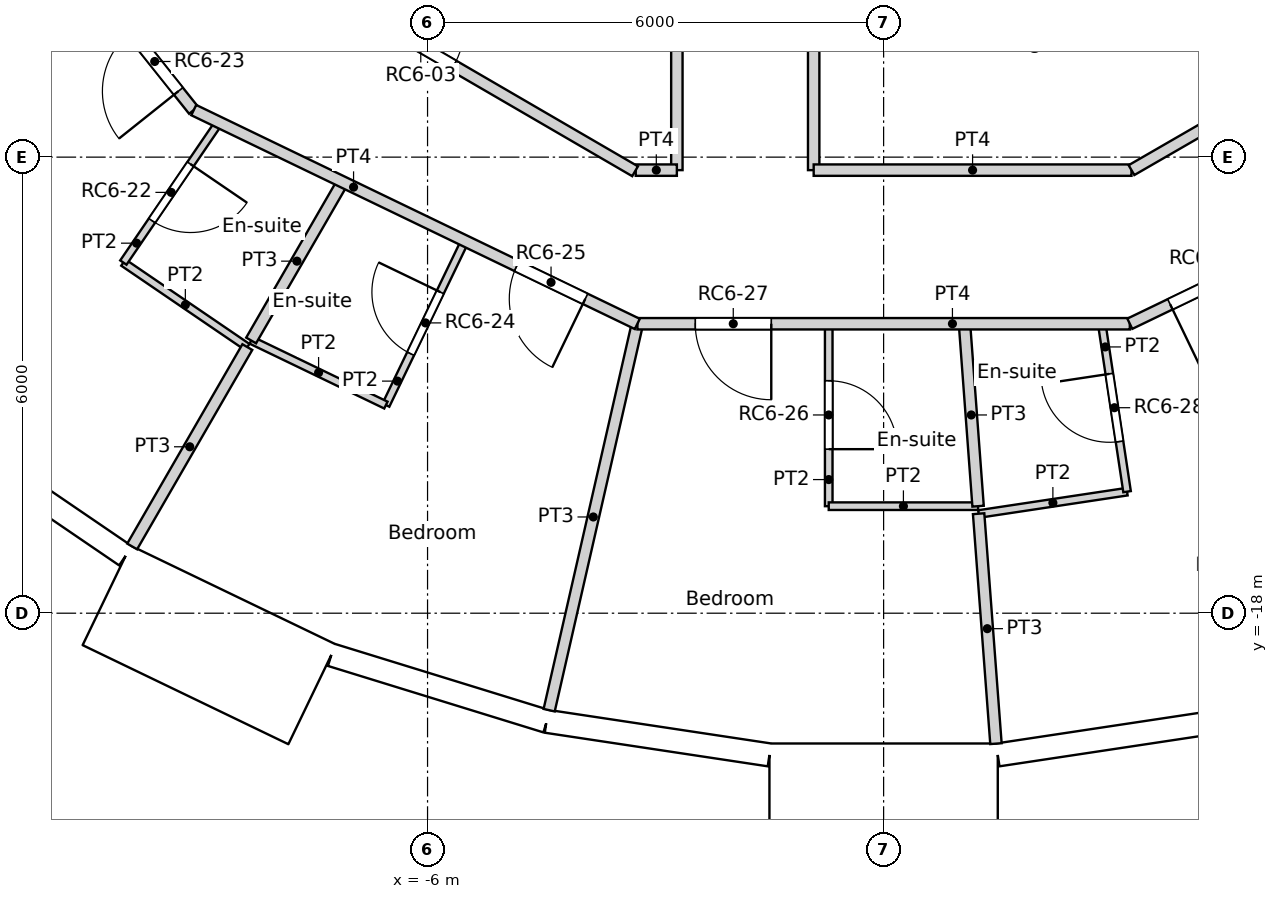
"""IFC4 building model, lengths in metres.
Left out: names, types, materials, properties, quantities, classifications, styles, units other than length and angle.
Written with IfcOpenShell. Run it as: python <this file> out.ifc"""

import sys

from ifc_helpers import new_model, si_unit, direction, frame, frame_2d, origin, origin_2d, place, context, subcontext, project, spatial, rectangle, circle, extrude, element, fill, save


model = new_model("IFC4")
c1 = context("Model", 3, precision=1e-05, world=origin(), true_north=direction((0.0, 1.0)))
c2 = subcontext(c1, "Body", "Model", "MODEL_VIEW")
j1 = project(units=[si_unit("LENGTHUNIT", "METRE"), si_unit("PLANEANGLEUNIT", "RADIAN")], contexts=[c1])
p1 = place(None, origin())
s1 = spatial("IfcSite", under=j1, at=p1, CompositionType="ELEMENT")
p2 = place(p1, origin())
s2 = spatial("IfcBuilding", under=s1, at=p2, CompositionType="ELEMENT")
p3 = place(p2, frame((0.0, 0.0, 283.8)))
s3 = spatial("IfcBuildingStorey", under=s2, at=p3, CompositionType="ELEMENT", Elevation=283.8)
for number, where, z_axis, x_axis in (
    (1, (-9.411, -16.301, 0.0), (0.0, 0.0, 1.0), (1.0, 0.0, 0.0)),
    (2, (-4.188, -18.35, 0.0), (0.0, 0.0, 1.0), (1.0, 0.0, 0.0)),
    (3, (1.406, -18.77, 0.0), (0.0, 0.0, 1.0), (1.0, 0.0, 0.0)),
):
    element("IfcColumn", number, at=place(p3, frame(where, z_axis=z_axis, x_axis=x_axis)), inside=s3, PredefinedType="COLUMN", context=c2, shape_type="SweptSolid", body=[
        extrude(circle(Radius=0.45, at=origin_2d()), origin(), (0.0, 0.0, 1.0), 3.6),
    ])
p4 = place(p3, frame((-12.421, -15.575, 0.0), z_axis=(0.0, 0.0, 1.0), x_axis=(0.826236061068, -0.563324037646, 0.0)))
e4 = element("IfcWall", 4, at=p4, inside=s3, PredefinedType="SOLIDWALL", context=c2, shape_type="SweptSolid", body=[
    extrude(rectangle(XDim=2.962, YDim=0.3, at=frame_2d((1.481, 0.0))), origin(), (0.0, 0.0, 1.0), 3.25),
])
p5 = place(p4, frame((1.481, 0.0, 1.55)))
e5 = element("IfcOpeningElement", 5, at=p5, cuts=e4, PredefinedType="OPENING", context=c2, shape_type="SweptSolid", body=[
    extrude(circle(Radius=0.9, at=origin_2d()), frame((0.0, 0.16, 0.0), z_axis=(0.0, -1.0, 0.0), x_axis=(1.0, 0.0, 0.0)), (0.0, 0.0, 1.0), 0.32),
])
p6 = place(p3, frame((-10.22, -17.766, -0.35), z_axis=(0.0, 0.0, 1.0), x_axis=(0.900953362039, -0.433915935904, 0.0)))
e6 = element("IfcWall", 6, at=p6, inside=s3, PredefinedType="ELEMENTEDWALL", context=c2, shape_type="SweptSolid", body=[
    extrude(rectangle(XDim=3.0, YDim=1.45, at=frame_2d((1.5, 0.0))), origin(), (0.0, 0.0, 1.0), 3.6),
])
p7 = place(p6, frame((1.5, 0.0, 1.9)))
e7 = element("IfcOpeningElement", 7, at=p7, cuts=e6, PredefinedType="OPENING", context=c2, shape_type="SweptSolid", body=[
    extrude(circle(Radius=0.9, at=origin_2d()), frame((0.0, 0.735, 0.0), z_axis=(0.0, -1.0, 0.0), x_axis=(1.0, 0.0, 0.0)), (0.0, 0.0, 1.0), 1.47),
])
p8 = place(p3, frame((-7.264, -18.549, 0.0), z_axis=(0.0, 0.0, 1.0), x_axis=(0.955555982805, -0.29480970765, 0.0)))
e8 = element("IfcWall", 8, at=p8, inside=s3, PredefinedType="SOLIDWALL", context=c2, shape_type="SweptSolid", body=[
    extrude(rectangle(XDim=2.962, YDim=0.3, at=frame_2d((1.481, 0.0))), origin(), (0.0, 0.0, 1.0), 3.25),
])
p9 = place(p8, frame((1.481, 0.0, 1.55)))
e9 = element("IfcOpeningElement", 9, at=p9, cuts=e8, PredefinedType="OPENING", context=c2, shape_type="SweptSolid", body=[
    extrude(circle(Radius=0.9, at=origin_2d()), frame((0.0, 0.16, 0.0), z_axis=(0.0, -1.0, 0.0), x_axis=(1.0, 0.0, 0.0)), (0.0, 0.0, 1.0), 0.32),
])
p10 = place(p3, frame((-4.433, -19.422, 0.0), z_axis=(0.0, 0.0, 1.0), x_axis=(0.988835775663, -0.149009425104, 0.0)))
e10 = element("IfcWall", 10, at=p10, inside=s3, PredefinedType="SOLIDWALL", context=c2, shape_type="SweptSolid", body=[
    extrude(rectangle(XDim=2.962, YDim=0.3, at=frame_2d((1.481, 0.0))), origin(), (0.0, 0.0, 1.0), 3.25),
])
p11 = place(p10, frame((1.481, 0.0, 1.55)))
e11 = element("IfcOpeningElement", 11, at=p11, cuts=e10, PredefinedType="OPENING", context=c2, shape_type="SweptSolid", body=[
    extrude(circle(Radius=0.9, at=origin_2d()), frame((0.0, 0.16, 0.0), z_axis=(0.0, -1.0, 0.0), x_axis=(1.0, 0.0, 0.0)), (0.0, 0.0, 1.0), 0.32),
])
p12 = place(p3, frame((-1.5, -20.441, -0.35), z_axis=(0.0, 0.0, 1.0), x_axis=(1.0, 0.0, 0.0)))
e12 = element("IfcWall", 12, at=p12, inside=s3, PredefinedType="ELEMENTEDWALL", context=c2, shape_type="SweptSolid", body=[
    extrude(rectangle(XDim=3.0, YDim=1.45, at=frame_2d((1.5, 0.0))), origin(), (0.0, 0.0, 1.0), 3.6),
])
p13 = place(p12, frame((1.5, 0.0, 1.9)))
e13 = element("IfcOpeningElement", 13, at=p13, cuts=e12, PredefinedType="OPENING", context=c2, shape_type="SweptSolid", body=[
    extrude(circle(Radius=0.9, at=origin_2d()), frame((0.0, 0.735, 0.0), z_axis=(0.0, -1.0, 0.0), x_axis=(1.0, 0.0, 0.0)), (0.0, 0.0, 1.0), 1.47),
])
p14 = place(p3, frame((1.504, -19.864, 0.0), z_axis=(0.0, 0.0, 1.0), x_axis=(0.988835775663, 0.149009425104, 0.0)))
e14 = element("IfcWall", 14, at=p14, inside=s3, PredefinedType="SOLIDWALL", context=c2, shape_type="SweptSolid", body=[
    extrude(rectangle(XDim=2.962, YDim=0.3, at=frame_2d((1.481, 0.0))), origin(), (0.0, 0.0, 1.0), 3.25),
])
p15 = place(p14, frame((1.481, 0.0, 1.55)))
e15 = element("IfcOpeningElement", 15, at=p15, cuts=e14, PredefinedType="OPENING", context=c2, shape_type="SweptSolid", body=[
    extrude(circle(Radius=0.9, at=origin_2d()), frame((0.0, 0.16, 0.0), z_axis=(0.0, -1.0, 0.0), x_axis=(1.0, 0.0, 0.0)), (0.0, 0.0, 1.0), 0.32),
])
p16 = place(p3, frame((-9.092, -8.8, 0.0), z_axis=(0.0, 0.0, 1.0), x_axis=(0.864470922103, -0.502682827277, 0.0)))
e16 = element("IfcWall", 16, at=p16, inside=s3, PredefinedType="PARTITIONING", context=c2, shape_type="SweptSolid", body=[
    extrude(rectangle(XDim=6.735, YDim=0.15, at=frame_2d((3.368, 0.0))), origin(), (0.0, 0.0, 1.0), 3.25),
])
p17 = place(p16, frame((2.974, 0.0, 0.0)))
e17 = element("IfcOpeningElement", 17, at=p17, cuts=e16, PredefinedType="OPENING", context=c2, shape_type="SweptSolid", body=[
    extrude(rectangle(XDim=1.0, YDim=2.04, at=frame_2d((0.5, 1.02))), frame((0.0, 0.075, 0.0), z_axis=(0.0, -1.0, 0.0), x_axis=(1.0, 0.0, 0.0)), (0.0, 0.0, 1.0), 0.15),
])
p18 = place(p3, frame((-11.3, -8.596, 0.0), z_axis=(0.0, 0.0, 1.0), x_axis=(0.623390921228, -0.781910326911, 0.0)))
e18 = element("IfcWall", 18, at=p18, inside=s3, PredefinedType="PARTITIONING", context=c2, shape_type="SweptSolid", body=[
    extrude(rectangle(XDim=3.564, YDim=0.15, at=frame_2d((1.782, 0.0))), origin(), (0.0, 0.0, 1.0), 3.25),
])
p19 = place(p18, frame((2.244, 0.0, 0.0)))
e19 = element("IfcOpeningElement", 19, at=p19, cuts=e18, PredefinedType="OPENING", context=c2, shape_type="SweptSolid", body=[
    extrude(rectangle(XDim=1.0, YDim=2.1, at=frame_2d((0.5, 1.05))), frame((0.0, 0.075, 0.0), z_axis=(0.0, -1.0, 0.0), x_axis=(1.0, 0.0, 0.0)), (0.0, 0.0, 1.0), 0.15),
])
p20 = place(p3, frame((-3.261, -12.171, 0.0), z_axis=(0.0, 0.0, 1.0), x_axis=(1.0, 0.0, 0.0)))
e20 = element("IfcWall", 20, at=p20, inside=s3, PredefinedType="PARTITIONING", context=c2, shape_type="SweptSolid", body=[
    extrude(rectangle(XDim=0.541, YDim=0.15, at=frame_2d((0.271, 0.0))), origin(), (0.0, 0.0, 1.0), 3.25),
])
for number, where, z_axis, x_axis in (
    (21, (-2.72, -12.171, 0.0), (0.0, 0.0, 1.0), (0.0, 1.0, 0.0)),
    (22, (-0.92, -12.171, 0.0), (0.0, 0.0, 1.0), (0.0, 1.0, 0.0)),
):
    element("IfcWall", number, at=place(p3, frame(where, z_axis=z_axis, x_axis=x_axis)), inside=s3, PredefinedType="PARTITIONING", context=c2, shape_type="SweptSolid", body=[
        extrude(rectangle(XDim=3.371, YDim=0.15, at=frame_2d((1.686, 0.0))), origin(), (0.0, 0.0, 1.0), 3.25),
    ])
p21 = place(p3, frame((-0.92, -12.171, 0.0), z_axis=(0.0, 0.0, 1.0), x_axis=(1.0, 0.0, 0.0)))
e23 = element("IfcWall", 23, at=p21, inside=s3, PredefinedType="PARTITIONING", context=c2, shape_type="SweptSolid", body=[
    extrude(rectangle(XDim=4.181, YDim=0.15, at=frame_2d((2.09, 0.0))), origin(), (0.0, 0.0, 1.0), 3.25),
])
p22 = place(p3, frame((3.261, -12.171, 0.0), z_axis=(0.0, 0.0, 1.0), x_axis=(0.866066809554, 0.499928276245, 0.0)))
e24 = element("IfcWall", 24, at=p22, inside=s3, PredefinedType="PARTITIONING", context=c2, shape_type="SweptSolid", body=[
    extrude(rectangle(XDim=6.743, YDim=0.15, at=frame_2d((3.371, 0.0))), origin(), (0.0, 0.0, 1.0), 3.25),
])
p23 = place(p3, frame((-9.076, -11.381, 0.0), z_axis=(0.0, 0.0, 1.0), x_axis=(0.900778421649, -0.434278983018, 0.0)))
e25 = element("IfcWall", 25, at=p23, inside=s3, PredefinedType="PARTITIONING", context=c2, shape_type="SweptSolid", body=[
    extrude(rectangle(XDim=6.479, YDim=0.15, at=frame_2d((3.239, 0.0))), origin(), (0.0, 0.0, 1.0), 3.25),
])
p24 = place(p23, frame((4.719, 0.0, 0.0)))
e26 = element("IfcOpeningElement", 26, at=p24, cuts=e25, PredefinedType="OPENING", context=c2, shape_type="SweptSolid", body=[
    extrude(rectangle(XDim=1.0, YDim=2.1, at=frame_2d((0.5, 1.05))), frame((0.0, 0.075, 0.0), z_axis=(0.0, -1.0, 0.0), x_axis=(1.0, 0.0, 0.0)), (0.0, 0.0, 1.0), 0.15),
])
p25 = place(p3, frame((-3.239, -14.192, 0.0), z_axis=(0.0, 0.0, 1.0), x_axis=(1.0, 0.0, 0.0)))
e27 = element("IfcWall", 27, at=p25, inside=s3, PredefinedType="PARTITIONING", context=c2, shape_type="SweptSolid", body=[
    extrude(rectangle(XDim=6.478, YDim=0.15, at=frame_2d((3.239, 0.0))), origin(), (0.0, 0.0, 1.0), 3.25),
])
p26 = place(p25, frame((0.761, 0.0, 0.0)))
e28 = element("IfcOpeningElement", 28, at=p26, cuts=e27, PredefinedType="OPENING", context=c2, shape_type="SweptSolid", body=[
    extrude(rectangle(XDim=1.0, YDim=2.1, at=frame_2d((0.5, 1.05))), frame((0.0, 0.075, 0.0), z_axis=(0.0, -1.0, 0.0), x_axis=(1.0, 0.0, 0.0)), (0.0, 0.0, 1.0), 0.15),
])
p27 = place(p3, frame((3.239, -14.192, 0.0), z_axis=(0.0, 0.0, 1.0), x_axis=(0.900851590682, 0.434127183629, 0.0)))
e29 = element("IfcWall", 29, at=p27, inside=s3, PredefinedType="PARTITIONING", context=c2, shape_type="SweptSolid", body=[
    extrude(rectangle(XDim=6.479, YDim=0.15, at=frame_2d((3.239, 0.0))), origin(), (0.0, 0.0, 1.0), 3.25),
])
p28 = place(p27, frame((0.589, 0.0, 0.0)))
e30 = element("IfcOpeningElement", 30, at=p28, cuts=e29, PredefinedType="OPENING", context=c2, shape_type="SweptSolid", body=[
    extrude(rectangle(XDim=1.0, YDim=2.1, at=frame_2d((0.5, 1.05))), frame((0.0, 0.075, 0.0), z_axis=(0.0, -1.0, 0.0), x_axis=(1.0, 0.0, 0.0)), (0.0, 0.0, 1.0), 0.15),
])
p29 = place(p27, frame((3.425, 0.0, 0.0)))
e31 = element("IfcOpeningElement", 31, at=p29, cuts=e29, PredefinedType="OPENING", context=c2, shape_type="SweptSolid", body=[
    extrude(rectangle(XDim=1.8, YDim=2.1, at=frame_2d((0.9, 1.05))), frame((0.0, 0.075, 0.0), z_axis=(0.0, -1.0, 0.0), x_axis=(1.0, 0.0, 0.0)), (0.0, 0.0, 1.0), 0.15),
])
p30 = place(p3, frame((-14.493, -13.448, 0.0), z_axis=(0.0, 0.0, 1.0), x_axis=(0.73295202722, 0.68028032883, 0.0)))
e32 = element("IfcWall", 32, at=p30, inside=s3, PredefinedType="PARTITIONING", context=c2, shape_type="SweptSolid", body=[
    extrude(rectangle(XDim=5.539, YDim=0.15, at=frame_2d((2.77, 0.0))), origin(), (0.0, 0.0, 1.0), 3.25),
])
p31 = place(p3, frame((-10.002, -13.387, 0.0), z_axis=(0.0, 0.0, 1.0), x_axis=(0.563469042551, 0.826137178734, 0.0)))
e33 = element("IfcWall", 33, at=p31, inside=s3, PredefinedType="PARTITIONING", context=c2, shape_type="SweptSolid", body=[
    extrude(rectangle(XDim=2.234, YDim=0.1, at=frame_2d((1.117, 0.0))), origin(), (0.0, 0.0, 1.0), 3.25),
])
p32 = place(p31, frame((0.667, 0.0, 0.0)))
e34 = element("IfcOpeningElement", 34, at=p32, cuts=e33, PredefinedType="OPENING", context=c2, shape_type="SweptSolid", body=[
    extrude(rectangle(XDim=0.9, YDim=2.04, at=frame_2d((0.45, 1.02))), frame((0.0, 0.05, 0.0), z_axis=(0.0, -1.0, 0.0), x_axis=(1.0, 0.0, 0.0)), (0.0, 0.0, 1.0), 0.1),
])
p33 = place(p3, frame((-10.002, -13.387, 0.0), z_axis=(0.0, 0.0, 1.0), x_axis=(0.82620117489, -0.563375202339, 0.0)))
e35 = element("IfcWall", 35, at=p33, inside=s3, PredefinedType="PARTITIONING", context=c2, shape_type="SweptSolid", body=[
    extrude(rectangle(XDim=1.974, YDim=0.1, at=frame_2d((0.987, 0.0))), origin(), (0.0, 0.0, 1.0), 3.25),
])
p34 = place(p3, frame((-9.886, -17.122, 0.0), z_axis=(0.0, 0.0, 1.0), x_axis=(0.500117793536, 0.865957384972, 0.0)))
e36 = element("IfcWall", 36, at=p34, inside=s3, PredefinedType="PARTITIONING", context=c2, shape_type="SweptSolid", body=[
    extrude(rectangle(XDim=3.029, YDim=0.15, at=frame_2d((1.515, 0.0))), origin(), (0.0, 0.0, 1.0), 3.25),
])
p35 = place(p3, frame((-8.321, -14.412, 0.0), z_axis=(0.0, 0.0, 1.0), x_axis=(0.500017667814, 0.866015203027, 0.0)))
e37 = element("IfcWall", 37, at=p35, inside=s3, PredefinedType="PARTITIONING", context=c2, shape_type="SweptSolid", body=[
    extrude(rectangle(XDim=2.41, YDim=0.15, at=frame_2d((1.205, 0.0))), origin(), (0.0, 0.0, 1.0), 3.25),
])
p36 = place(p3, frame((-8.319, -14.409, 0.0), z_axis=(0.0, 0.0, 1.0), x_axis=(0.900936932599, -0.433950047216, 0.0)))
e38 = element("IfcWall", 38, at=p36, inside=s3, PredefinedType="PARTITIONING", context=c2, shape_type="SweptSolid", body=[
    extrude(rectangle(XDim=1.966, YDim=0.1, at=frame_2d((0.983, 0.0))), origin(), (0.0, 0.0, 1.0), 3.25),
])
p37 = place(p3, frame((-6.548, -15.262, 0.0), z_axis=(0.0, 0.0, 1.0), x_axis=(0.433855388624, 0.900982520231, 0.0)))
e39 = element("IfcWall", 39, at=p37, inside=s3, PredefinedType="PARTITIONING", context=c2, shape_type="SweptSolid", body=[
    extrude(rectangle(XDim=2.399, YDim=0.1, at=frame_2d((1.2, 0.0))), origin(), (0.0, 0.0, 1.0), 3.25),
])
p38 = place(p37, frame((0.75, 0.0, 0.0)))
e40 = element("IfcOpeningElement", 40, at=p38, cuts=e39, PredefinedType="OPENING", context=c2, shape_type="SweptSolid", body=[
    extrude(rectangle(XDim=0.9, YDim=2.04, at=frame_2d((0.45, 1.02))), frame((0.0, 0.05, 0.0), z_axis=(0.0, -1.0, 0.0), x_axis=(1.0, 0.0, 0.0)), (0.0, 0.0, 1.0), 0.1),
])
p39 = place(p3, frame((-4.4, -19.276, 0.0), z_axis=(0.0, 0.0, 1.0), x_axis=(0.222612505682, 0.974907007008, 0.0)))
e41 = element("IfcWall", 41, at=p39, inside=s3, PredefinedType="PARTITIONING", context=c2, shape_type="SweptSolid", body=[
    extrude(rectangle(XDim=5.215, YDim=0.15, at=frame_2d((2.607, 0.0))), origin(), (0.0, 0.0, 1.0), 3.25),
])
p40 = place(p3, frame((-0.722, -16.592, 0.0), z_axis=(0.0, 0.0, 1.0), x_axis=(0.0, 1.0, 0.0)))
e42 = element("IfcWall", 42, at=p40, inside=s3, PredefinedType="PARTITIONING", context=c2, shape_type="SweptSolid", body=[
    extrude(rectangle(XDim=2.4, YDim=0.1, at=frame_2d((1.2, 0.0))), origin(), (0.0, 0.0, 1.0), 3.25),
])
p41 = place(p40, frame((0.75, 0.0, 0.0)))
e43 = element("IfcOpeningElement", 43, at=p41, cuts=e42, PredefinedType="OPENING", context=c2, shape_type="SweptSolid", body=[
    extrude(rectangle(XDim=0.9, YDim=2.04, at=frame_2d((0.45, 1.02))), frame((0.0, 0.05, 0.0), z_axis=(0.0, -1.0, 0.0), x_axis=(1.0, 0.0, 0.0)), (0.0, 0.0, 1.0), 0.1),
])
p42 = place(p3, frame((-0.722, -16.592, 0.0), z_axis=(0.0, 0.0, 1.0), x_axis=(1.0, 0.0, 0.0)))
e44 = element("IfcWall", 44, at=p42, inside=s3, PredefinedType="PARTITIONING", context=c2, shape_type="SweptSolid", body=[
    extrude(rectangle(XDim=1.965, YDim=0.1, at=frame_2d((0.982, 0.0))), origin(), (0.0, 0.0, 1.0), 3.25),
])
p43 = place(p3, frame((1.25, -16.691, 0.0), z_axis=(0.0, 0.0, 1.0), x_axis=(0.075164061246, -0.99717118084, 0.0)))
e45 = element("IfcWall", 45, at=p43, inside=s3, PredefinedType="PARTITIONING", context=c2, shape_type="SweptSolid", body=[
    extrude(rectangle(XDim=3.034, YDim=0.15, at=frame_2d((1.517, 0.0))), origin(), (0.0, 0.0, 1.0), 3.25),
])
p44 = place(p3, frame((1.064, -14.192, 0.0), z_axis=(0.0, 0.0, 1.0), x_axis=(0.074353677934, -0.997231934195, 0.0)))
e46 = element("IfcWall", 46, at=p44, inside=s3, PredefinedType="PARTITIONING", context=c2, shape_type="SweptSolid", body=[
    extrude(rectangle(XDim=2.407, YDim=0.15, at=frame_2d((1.203, 0.0))), origin(), (0.0, 0.0, 1.0), 3.25),
])
p45 = place(p3, frame((1.251, -16.695, 0.0), z_axis=(0.0, 0.0, 1.0), x_axis=(0.988831780565, 0.149035934407, 0.0)))
e47 = element("IfcWall", 47, at=p45, inside=s3, PredefinedType="PARTITIONING", context=c2, shape_type="SweptSolid", body=[
    extrude(rectangle(XDim=1.974, YDim=0.1, at=frame_2d((0.987, 0.0))), origin(), (0.0, 0.0, 1.0), 3.25),
])
p46 = place(p3, frame((2.87, -14.192, 0.0), z_axis=(0.0, 0.0, 1.0), x_axis=(0.148960349288, -0.988843169739, 0.0)))
e48 = element("IfcWall", 48, at=p46, inside=s3, PredefinedType="PARTITIONING", context=c2, shape_type="SweptSolid", body=[
    extrude(rectangle(XDim=2.234, YDim=0.1, at=frame_2d((1.117, 0.0))), origin(), (0.0, 0.0, 1.0), 3.25),
])
p47 = place(p46, frame((0.667, 0.0, 0.0)))
e49 = element("IfcOpeningElement", 49, at=p47, cuts=e48, PredefinedType="OPENING", context=c2, shape_type="SweptSolid", body=[
    extrude(rectangle(XDim=0.9, YDim=2.04, at=frame_2d((0.45, 1.02))), frame((0.0, 0.05, 0.0), z_axis=(0.0, -1.0, 0.0), x_axis=(1.0, 0.0, 0.0)), (0.0, 0.0, 1.0), 0.1),
])
p48 = place(p5, origin())
e50 = element("IfcWindow", 50, at=p48, inside=s3, PartitioningType="SINGLE_PANEL", PredefinedType="WINDOW", context=c2, shape_type="SweptSolid", body=[
    extrude(circle(Radius=0.9, at=origin_2d()), frame((0.0, 0.12, 0.0), z_axis=(0.0, -1.0, 0.0), x_axis=(1.0, 0.0, 0.0)), (0.0, 0.0, 1.0), 0.1),
])
fill(e5, e50)
p49 = place(p7, origin())
e51 = element("IfcWindow", 51, at=p49, inside=s3, PartitioningType="SINGLE_PANEL", PredefinedType="WINDOW", context=c2, shape_type="SweptSolid", body=[
    extrude(circle(Radius=0.9, at=origin_2d()), frame((0.0, 0.695, 0.0), z_axis=(0.0, -1.0, 0.0), x_axis=(1.0, 0.0, 0.0)), (0.0, 0.0, 1.0), 0.1),
])
fill(e7, e51)
p50 = place(p9, origin())
e52 = element("IfcWindow", 52, at=p50, inside=s3, PartitioningType="SINGLE_PANEL", PredefinedType="WINDOW", context=c2, shape_type="SweptSolid", body=[
    extrude(circle(Radius=0.9, at=origin_2d()), frame((0.0, 0.12, 0.0), z_axis=(0.0, -1.0, 0.0), x_axis=(1.0, 0.0, 0.0)), (0.0, 0.0, 1.0), 0.1),
])
fill(e9, e52)
p51 = place(p11, origin())
e53 = element("IfcWindow", 53, at=p51, inside=s3, PartitioningType="SINGLE_PANEL", PredefinedType="WINDOW", context=c2, shape_type="SweptSolid", body=[
    extrude(circle(Radius=0.9, at=origin_2d()), frame((0.0, 0.12, 0.0), z_axis=(0.0, -1.0, 0.0), x_axis=(1.0, 0.0, 0.0)), (0.0, 0.0, 1.0), 0.1),
])
fill(e11, e53)
p52 = place(p13, origin())
e54 = element("IfcWindow", 54, at=p52, inside=s3, PartitioningType="SINGLE_PANEL", PredefinedType="WINDOW", context=c2, shape_type="SweptSolid", body=[
    extrude(circle(Radius=0.9, at=origin_2d()), frame((0.0, 0.695, 0.0), z_axis=(0.0, -1.0, 0.0), x_axis=(1.0, 0.0, 0.0)), (0.0, 0.0, 1.0), 0.1),
])
fill(e13, e54)
p53 = place(p15, origin())
e55 = element("IfcWindow", 55, at=p53, inside=s3, PartitioningType="SINGLE_PANEL", PredefinedType="WINDOW", context=c2, shape_type="SweptSolid", body=[
    extrude(circle(Radius=0.9, at=origin_2d()), frame((0.0, 0.12, 0.0), z_axis=(0.0, -1.0, 0.0), x_axis=(1.0, 0.0, 0.0)), (0.0, 0.0, 1.0), 0.1),
])
fill(e15, e55)
p54 = place(p17, origin())
e56 = element("IfcDoor", 56, at=p54, inside=s3, OperationType="SINGLE_SWING_LEFT", PredefinedType="DOOR", context=c2, shape_type="SweptSolid", body=[
    extrude(rectangle(XDim=1.0, YDim=2.04, at=frame_2d((0.5, 1.02))), frame((0.0, 0.025, 0.0), z_axis=(0.0, -1.0, 0.0), x_axis=(1.0, 0.0, 0.0)), (0.0, 0.0, 1.0), 0.05),
])
fill(e17, e56)
p55 = place(p32, origin())
e57 = element("IfcDoor", 57, at=p55, inside=s3, OperationType="SINGLE_SWING_LEFT", PredefinedType="DOOR", context=c2, shape_type="SweptSolid", body=[
    extrude(rectangle(XDim=0.9, YDim=2.04, at=frame_2d((0.45, 1.02))), frame((0.0, 0.025, 0.0), z_axis=(0.0, -1.0, 0.0), x_axis=(1.0, 0.0, 0.0)), (0.0, 0.0, 1.0), 0.05),
])
fill(e34, e57)
p56 = place(p19, origin())
e58 = element("IfcDoor", 58, at=p56, inside=s3, OperationType="SINGLE_SWING_LEFT", PredefinedType="DOOR", context=c2, shape_type="SweptSolid", body=[
    extrude(rectangle(XDim=1.0, YDim=2.1, at=frame_2d((0.5, 1.05))), frame((0.0, 0.025, 0.0), z_axis=(0.0, -1.0, 0.0), x_axis=(1.0, 0.0, 0.0)), (0.0, 0.0, 1.0), 0.05),
])
fill(e19, e58)
p57 = place(p38, origin())
e59 = element("IfcDoor", 59, at=p57, inside=s3, OperationType="SINGLE_SWING_RIGHT", PredefinedType="DOOR", context=c2, shape_type="SweptSolid", body=[
    extrude(rectangle(XDim=0.9, YDim=2.04, at=frame_2d((0.45, 1.02))), frame((0.0, 0.025, 0.0), z_axis=(0.0, -1.0, 0.0), x_axis=(1.0, 0.0, 0.0)), (0.0, 0.0, 1.0), 0.05),
])
fill(e40, e59)
p58 = place(p24, origin())
e60 = element("IfcDoor", 60, at=p58, inside=s3, OperationType="SINGLE_SWING_LEFT", PredefinedType="DOOR", context=c2, shape_type="SweptSolid", body=[
    extrude(rectangle(XDim=1.0, YDim=2.1, at=frame_2d((0.5, 1.05))), frame((0.0, 0.025, 0.0), z_axis=(0.0, -1.0, 0.0), x_axis=(1.0, 0.0, 0.0)), (0.0, 0.0, 1.0), 0.05),
])
fill(e26, e60)
p59 = place(p41, origin())
e61 = element("IfcDoor", 61, at=p59, inside=s3, OperationType="SINGLE_SWING_RIGHT", PredefinedType="DOOR", context=c2, shape_type="SweptSolid", body=[
    extrude(rectangle(XDim=0.9, YDim=2.04, at=frame_2d((0.45, 1.02))), frame((0.0, 0.025, 0.0), z_axis=(0.0, -1.0, 0.0), x_axis=(1.0, 0.0, 0.0)), (0.0, 0.0, 1.0), 0.05),
])
fill(e43, e61)
p60 = place(p26, origin())
e62 = element("IfcDoor", 62, at=p60, inside=s3, OperationType="SINGLE_SWING_LEFT", PredefinedType="DOOR", context=c2, shape_type="SweptSolid", body=[
    extrude(rectangle(XDim=1.0, YDim=2.1, at=frame_2d((0.5, 1.05))), frame((0.0, 0.025, 0.0), z_axis=(0.0, -1.0, 0.0), x_axis=(1.0, 0.0, 0.0)), (0.0, 0.0, 1.0), 0.05),
])
fill(e28, e62)
p61 = place(p47, origin())
e63 = element("IfcDoor", 63, at=p61, inside=s3, OperationType="SINGLE_SWING_RIGHT", PredefinedType="DOOR", context=c2, shape_type="SweptSolid", body=[
    extrude(rectangle(XDim=0.9, YDim=2.04, at=frame_2d((0.45, 1.02))), frame((0.0, 0.025, 0.0), z_axis=(0.0, -1.0, 0.0), x_axis=(1.0, 0.0, 0.0)), (0.0, 0.0, 1.0), 0.05),
])
fill(e49, e63)
p62 = place(p28, origin())
e64 = element("IfcDoor", 64, at=p62, inside=s3, OperationType="SINGLE_SWING_RIGHT", PredefinedType="DOOR", context=c2, shape_type="SweptSolid", body=[
    extrude(rectangle(XDim=1.0, YDim=2.1, at=frame_2d((0.5, 1.05))), frame((0.0, 0.025, 0.0), z_axis=(0.0, -1.0, 0.0), x_axis=(1.0, 0.0, 0.0)), (0.0, 0.0, 1.0), 0.05),
])
fill(e30, e64)
save(model, sys.argv[1])
